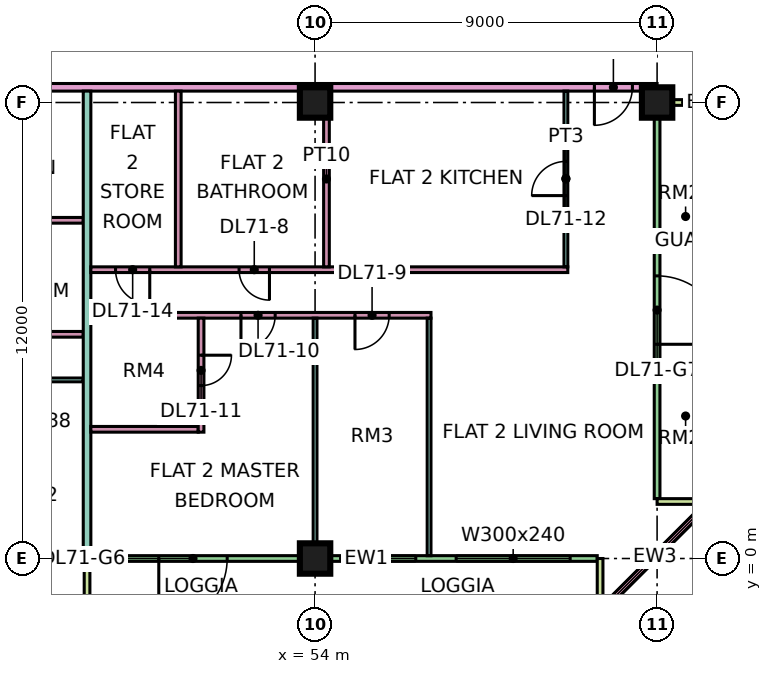
"""IFC4 building model, lengths in metres.
Left out: names, types, materials, properties, quantities, classifications, styles, units other than length and angle.
Written with IfcOpenShell. Run it as: python <this file> out.ifc"""

import sys

from ifc_helpers import new_model, si_unit, direction, frame, frame_2d, origin, origin_2d, place, context, subcontext, project, spatial, rectangle, extrude, element, fill, save


model = new_model("IFC4")
c1 = context("Model", 3, precision=1e-05, world=origin(), true_north=direction((0.0, 1.0)))
c2 = subcontext(c1, "Body", "Model", "MODEL_VIEW")
j1 = project(units=[si_unit("LENGTHUNIT", "METRE"), si_unit("PLANEANGLEUNIT", "RADIAN")], contexts=[c1])
p1 = place(None, origin())
s1 = spatial("IfcSite", under=j1, at=p1, CompositionType="ELEMENT")
p2 = place(p1, origin())
s2 = spatial("IfcBuilding", under=s1, at=p2, CompositionType="ELEMENT")
p3 = place(p2, frame((0.0, 0.0, 303.4)))
s3 = spatial("IfcBuildingStorey", under=s2, at=p3, CompositionType="ELEMENT", Elevation=303.4)
for number, where, z_axis, x_axis in (
    (1, (54.0, 0.0, 0.0), (0.0, 0.0, 1.0), (1.0, 0.0, 0.0)),
    (2, (54.0, 12.0, 0.0), (0.0, 0.0, 1.0), (1.0, 0.0, 0.0)),
    (3, (63.0, 12.0, 0.0), (0.0, 0.0, 1.0), (1.0, 0.0, 0.0)),
):
    element("IfcColumn", number, at=place(p3, frame(where, z_axis=z_axis, x_axis=x_axis)), inside=s3, PredefinedType="COLUMN", context=c2, shape_type="SweptSolid", body=[
        extrude(rectangle(XDim=0.8, YDim=0.8, at=origin_2d()), origin(), (0.0, 0.0, 1.0), 3.75),
    ])
p4 = place(p3, frame((48.075, 0.0, 0.0), z_axis=(0.0, 0.0, 1.0), x_axis=(1.0, 0.0, 0.0)))
e4 = element("IfcWall", 4, at=p4, inside=s3, PredefinedType="SOLIDWALL", context=c2, shape_type="SweptSolid", body=[
    extrude(rectangle(XDim=13.35, YDim=0.15, at=frame_2d((6.675, 0.0))), origin(), (0.0, 0.0, 1.0), 3.35),
])
p5 = place(p4, frame((1.812, 0.0, 0.0)))
e5 = element("IfcOpeningElement", 5, at=p5, cuts=e4, PredefinedType="OPENING", context=c2, shape_type="SweptSolid", body=[
    extrude(rectangle(XDim=1.8, YDim=2.4, at=frame_2d((0.9, 1.2))), frame((0.0, 0.085, 0.0), z_axis=(0.0, -1.0, 0.0), x_axis=(1.0, 0.0, 0.0)), (0.0, 0.0, 1.0), 0.17),
])
p6 = place(p4, frame((6.775, 0.0, 0.45)))
e6 = element("IfcOpeningElement", 6, at=p6, cuts=e4, PredefinedType="OPENING", context=c2, shape_type="SweptSolid", body=[
    extrude(rectangle(XDim=1.8, YDim=2.4, at=frame_2d((0.9, 1.2))), frame((0.0, 0.085, 0.0), z_axis=(0.0, -1.0, 0.0), x_axis=(1.0, 0.0, 0.0)), (0.0, 0.0, 1.0), 0.17),
])
p7 = place(p4, frame((9.637, 0.0, 0.45)))
e7 = element("IfcOpeningElement", 7, at=p7, cuts=e4, PredefinedType="OPENING", context=c2, shape_type="SweptSolid", body=[
    extrude(rectangle(XDim=3.0, YDim=2.4, at=frame_2d((1.5, 1.2))), frame((0.0, 0.085, 0.0), z_axis=(0.0, -1.0, 0.0), x_axis=(1.0, 0.0, 0.0)), (0.0, 0.0, 1.0), 0.17),
])
for number, where, z_axis, x_axis in (
    (8, (48.0, -1.5, 0.0), (0.0, 0.0, 1.0), (0.0, 1.0, 0.0)),
    (9, (61.5, -1.5, 0.0), (0.0, 0.0, 1.0), (0.0, 1.0, 0.0)),
):
    element("IfcWall", number, at=place(p3, frame(where, z_axis=z_axis, x_axis=x_axis)), inside=s3, PredefinedType="SOLIDWALL", context=c2, shape_type="SweptSolid", body=[
        extrude(rectangle(XDim=1.5, YDim=0.15, at=frame_2d((0.75, 0.0))), origin(), (0.0, 0.0, 1.0), 3.35),
    ])
p8 = place(p3, frame((61.447, -1.447, 0.0), z_axis=(0.0, 0.0, 1.0), x_axis=(0.707106781187, 0.707106781187, 0.0)))
e10 = element("IfcWall", 10, at=p8, inside=s3, PredefinedType="SOLIDWALL", context=c2, shape_type="SweptSolid", body=[
    extrude(rectangle(XDim=4.243, YDim=0.15, at=frame_2d((2.121, 0.0))), origin(), (0.0, 0.0, 1.0), 3.35),
])
p9 = place(p8, frame((0.621, 0.0, 0.45)))
e11 = element("IfcOpeningElement", 11, at=p9, cuts=e10, PredefinedType="OPENING", context=c2, shape_type="SweptSolid", body=[
    extrude(rectangle(XDim=3.0, YDim=2.4, at=frame_2d((1.5, 1.2))), frame((0.0, 0.085, 0.0), z_axis=(0.0, -1.0, 0.0), x_axis=(1.0, 0.0, 0.0)), (0.0, 0.0, 1.0), 0.17),
])
p10 = place(p3, frame((63.0, 1.575, 0.0), z_axis=(0.0, 0.0, 1.0), x_axis=(0.0, 1.0, 0.0)))
e12 = element("IfcWall", 12, at=p10, inside=s3, PredefinedType="SOLIDWALL", context=c2, shape_type="SweptSolid", body=[
    extrude(rectangle(XDim=10.35, YDim=0.15, at=frame_2d((5.175, 0.0))), origin(), (0.0, 0.0, 1.0), 3.35),
])
p11 = place(p10, frame((4.062, 0.0, 0.0)))
e13 = element("IfcOpeningElement", 13, at=p11, cuts=e12, PredefinedType="OPENING", context=c2, shape_type="SweptSolid", body=[
    extrude(rectangle(XDim=1.8, YDim=2.4, at=frame_2d((0.9, 1.2))), frame((0.0, 0.085, 0.0), z_axis=(0.0, -1.0, 0.0), x_axis=(1.0, 0.0, 0.0)), (0.0, 0.0, 1.0), 0.17),
])
for number, where, z_axis, x_axis in (
    (14, (64.5, 1.5, 0.0), (0.0, 0.0, 1.0), (-1.0, 0.0, 0.0)),
    (15, (64.5, 12.0, 0.0), (0.0, 0.0, 1.0), (-1.0, 0.0, 0.0)),
):
    element("IfcWall", number, at=place(p3, frame(where, z_axis=z_axis, x_axis=x_axis)), inside=s3, PredefinedType="SOLIDWALL", context=c2, shape_type="SweptSolid", body=[
        extrude(rectangle(XDim=1.5, YDim=0.15, at=frame_2d((0.75, 0.0))), origin(), (0.0, 0.0, 1.0), 3.35),
    ])
p12 = place(p3, frame((33.05, 4.7, 0.0), z_axis=(0.0, 0.0, 1.0), x_axis=(1.0, 0.0, 0.0)))
e16 = element("IfcWall", 16, at=p12, inside=s3, PredefinedType="PARTITIONING", context=c2, shape_type="SweptSolid", body=[
    extrude(rectangle(XDim=14.85, YDim=0.1, at=frame_2d((7.425, 0.0))), origin(), (0.0, 0.0, 1.0), 3.35),
])
p13 = place(p12, frame((1.0, 0.0, 0.0)))
e17 = element("IfcOpeningElement", 17, at=p13, cuts=e16, PredefinedType="OPENING", context=c2, shape_type="SweptSolid", body=[
    extrude(rectangle(XDim=0.9, YDim=2.1, at=frame_2d((0.45, 1.05))), frame((0.0, 0.06, 0.0), z_axis=(0.0, -1.0, 0.0), x_axis=(1.0, 0.0, 0.0)), (0.0, 0.0, 1.0), 0.12),
])
p14 = place(p12, frame((13.0, 0.0, 0.0)))
e18 = element("IfcOpeningElement", 18, at=p14, cuts=e16, PredefinedType="OPENING", context=c2, shape_type="SweptSolid", body=[
    extrude(rectangle(XDim=0.9, YDim=2.1, at=frame_2d((0.45, 1.05))), frame((0.0, 0.06, 0.0), z_axis=(0.0, -1.0, 0.0), x_axis=(1.0, 0.0, 0.0)), (0.0, 0.0, 1.0), 0.12),
])
p15 = place(p12, frame((7.0, 0.0, 0.0)))
e19 = element("IfcOpeningElement", 19, at=p15, cuts=e16, PredefinedType="OPENING", context=c2, shape_type="SweptSolid", body=[
    extrude(rectangle(XDim=0.9, YDim=2.1, at=frame_2d((0.45, 1.05))), frame((0.0, 0.06, 0.0), z_axis=(0.0, -1.0, 0.0), x_axis=(1.0, 0.0, 0.0)), (0.0, 0.0, 1.0), 0.12),
])
p16 = place(p3, frame((40.65, 12.4, 0.0), z_axis=(0.0, 0.0, 1.0), x_axis=(1.0, 0.0, 0.0)))
e20 = element("IfcWall", 20, at=p16, inside=s3, PredefinedType="PARTITIONING", context=c2, shape_type="SweptSolid", body=[
    extrude(rectangle(XDim=22.35, YDim=0.2, at=frame_2d((11.175, 0.0))), origin(), (0.0, 0.0, 1.0), 3.35),
])
p17 = place(p16, frame((20.7, 0.0, 0.0)))
e21 = element("IfcOpeningElement", 21, at=p17, cuts=e20, PredefinedType="OPENING", context=c2, shape_type="SweptSolid", body=[
    extrude(rectangle(XDim=1.0, YDim=2.1, at=frame_2d((0.5, 1.05))), frame((0.0, 0.11, 0.0), z_axis=(0.0, -1.0, 0.0), x_axis=(1.0, 0.0, 0.0)), (0.0, 0.0, 1.0), 0.22),
])
p18 = place(p16, frame((1.05, 0.0, 0.0)))
e22 = element("IfcOpeningElement", 22, at=p18, cuts=e20, PredefinedType="OPENING", context=c2, shape_type="SweptSolid", body=[
    extrude(rectangle(XDim=1.0, YDim=2.1, at=frame_2d((0.5, 1.05))), frame((0.0, 0.11, 0.0), z_axis=(0.0, -1.0, 0.0), x_axis=(1.0, 0.0, 0.0)), (0.0, 0.0, 1.0), 0.22),
])
p19 = place(p3, frame((43.725, 5.9, 0.0), z_axis=(0.0, 0.0, 1.0), x_axis=(1.0, 0.0, 0.0)))
e23 = element("IfcWall", 23, at=p19, inside=s3, PredefinedType="PARTITIONING", context=c2, shape_type="SweptSolid", body=[
    extrude(rectangle(XDim=4.175, YDim=0.15, at=frame_2d((2.087, 0.0))), origin(), (0.0, 0.0, 1.0), 3.35),
])
p20 = place(p19, frame((1.675, 0.0, 0.0)))
e24 = element("IfcOpeningElement", 24, at=p20, cuts=e23, PredefinedType="OPENING", context=c2, shape_type="SweptSolid", body=[
    extrude(rectangle(XDim=0.8, YDim=2.1, at=frame_2d((0.4, 1.05))), frame((0.0, 0.085, 0.0), z_axis=(0.0, -1.0, 0.0), x_axis=(1.0, 0.0, 0.0)), (0.0, 0.0, 1.0), 0.17),
])
p21 = place(p3, frame((43.725, 8.9, 0.0), z_axis=(0.0, 0.0, 1.0), x_axis=(1.0, 0.0, 0.0)))
e25 = element("IfcWall", 25, at=p21, inside=s3, PredefinedType="PARTITIONING", context=c2, shape_type="SweptSolid", body=[
    extrude(rectangle(XDim=4.175, YDim=0.15, at=frame_2d((2.087, 0.0))), origin(), (0.0, 0.0, 1.0), 3.35),
])
p22 = place(p3, frame((48.0, 0.0, 0.0), z_axis=(0.0, 0.0, 1.0), x_axis=(0.0, 1.0, 0.0)))
e26 = element("IfcWall", 26, at=p22, inside=s3, PredefinedType="PARTITIONING", context=c2, shape_type="SweptSolid", body=[
    extrude(rectangle(XDim=12.3, YDim=0.2, at=frame_2d((6.15, 0.0))), origin(), (0.0, 0.0, 1.0), 3.35),
])
p23 = place(p3, frame((48.1, 3.4, 0.0), z_axis=(0.0, 0.0, 1.0), x_axis=(1.0, 0.0, 0.0)))
e27 = element("IfcWall", 27, at=p23, inside=s3, PredefinedType="PARTITIONING", context=c2, shape_type="SweptSolid", body=[
    extrude(rectangle(XDim=2.825, YDim=0.15, at=frame_2d((1.413, 0.0))), origin(), (0.0, 0.0, 1.0), 3.35),
])
p24 = place(p3, frame((48.1, 6.4, 0.0), z_axis=(0.0, 0.0, 1.0), x_axis=(1.0, 0.0, 0.0)))
e28 = element("IfcWall", 28, at=p24, inside=s3, PredefinedType="PARTITIONING", context=c2, shape_type="SweptSolid", body=[
    extrude(rectangle(XDim=8.95, YDim=0.15, at=frame_2d((4.475, 0.0))), origin(), (0.0, 0.0, 1.0), 3.35),
])
p25 = place(p24, frame((6.95, 0.0, 0.0)))
e29 = element("IfcOpeningElement", 29, at=p25, cuts=e28, PredefinedType="OPENING", context=c2, shape_type="SweptSolid", body=[
    extrude(rectangle(XDim=0.9, YDim=2.1, at=frame_2d((0.45, 1.05))), frame((0.0, 0.085, 0.0), z_axis=(0.0, -1.0, 0.0), x_axis=(1.0, 0.0, 0.0)), (0.0, 0.0, 1.0), 0.17),
])
p26 = place(p24, frame((3.95, 0.0, 0.0)))
e30 = element("IfcOpeningElement", 30, at=p26, cuts=e28, PredefinedType="OPENING", context=c2, shape_type="SweptSolid", body=[
    extrude(rectangle(XDim=0.9, YDim=2.1, at=frame_2d((0.45, 1.05))), frame((0.0, 0.085, 0.0), z_axis=(0.0, -1.0, 0.0), x_axis=(1.0, 0.0, 0.0)), (0.0, 0.0, 1.0), 0.17),
])
p27 = place(p3, frame((48.1, 7.6, 0.0), z_axis=(0.0, 0.0, 1.0), x_axis=(1.0, 0.0, 0.0)))
e31 = element("IfcWall", 31, at=p27, inside=s3, PredefinedType="PARTITIONING", context=c2, shape_type="SweptSolid", body=[
    extrude(rectangle(XDim=12.55, YDim=0.15, at=frame_2d((6.275, 0.0))), origin(), (0.0, 0.0, 1.0), 3.35),
])
p28 = place(p27, frame((3.9, 0.0, 0.0)))
e32 = element("IfcOpeningElement", 32, at=p28, cuts=e31, PredefinedType="OPENING", context=c2, shape_type="SweptSolid", body=[
    extrude(rectangle(XDim=0.8, YDim=2.1, at=frame_2d((0.4, 1.05))), frame((0.0, 0.085, 0.0), z_axis=(0.0, -1.0, 0.0), x_axis=(1.0, 0.0, 0.0)), (0.0, 0.0, 1.0), 0.17),
])
p29 = place(p27, frame((0.65, 0.0, 0.0)))
e33 = element("IfcOpeningElement", 33, at=p29, cuts=e31, PredefinedType="OPENING", context=c2, shape_type="SweptSolid", body=[
    extrude(rectangle(XDim=0.9, YDim=2.1, at=frame_2d((0.45, 1.05))), frame((0.0, 0.085, 0.0), z_axis=(0.0, -1.0, 0.0), x_axis=(1.0, 0.0, 0.0)), (0.0, 0.0, 1.0), 0.17),
])
p30 = place(p3, frame((50.4, 7.675, 0.0), z_axis=(0.0, 0.0, 1.0), x_axis=(0.0, 1.0, 0.0)))
e34 = element("IfcWall", 34, at=p30, inside=s3, PredefinedType="PARTITIONING", context=c2, shape_type="SweptSolid", body=[
    extrude(rectangle(XDim=4.625, YDim=0.15, at=frame_2d((2.312, 0.0))), origin(), (0.0, 0.0, 1.0), 3.35),
])
p31 = place(p3, frame((51.0, 3.325, 0.0), z_axis=(0.0, 0.0, 1.0), x_axis=(0.0, 1.0, 0.0)))
e35 = element("IfcWall", 35, at=p31, inside=s3, PredefinedType="PARTITIONING", context=c2, shape_type="SweptSolid", body=[
    extrude(rectangle(XDim=3.0, YDim=0.15, at=frame_2d((1.5, 0.0))), origin(), (0.0, 0.0, 1.0), 3.35),
])
p32 = place(p31, frame((1.225, 0.0, 0.0)))
e36 = element("IfcOpeningElement", 36, at=p32, cuts=e35, PredefinedType="OPENING", context=c2, shape_type="SweptSolid", body=[
    extrude(rectangle(XDim=0.8, YDim=2.1, at=frame_2d((0.4, 1.05))), frame((0.0, 0.085, 0.0), z_axis=(0.0, -1.0, 0.0), x_axis=(1.0, 0.0, 0.0)), (0.0, 0.0, 1.0), 0.17),
])
p33 = place(p3, frame((54.0, 0.074, 0.0), z_axis=(0.0, 0.0, 1.0), x_axis=(0.0, 1.0, 0.0)))
e37 = element("IfcWall", 37, at=p33, inside=s3, PredefinedType="PARTITIONING", context=c2, shape_type="SweptSolid", body=[
    extrude(rectangle(XDim=6.251, YDim=0.1, at=frame_2d((3.125, 0.0))), origin(), (0.0, 0.0, 1.0), 3.35),
])
p34 = place(p3, frame((54.3, 7.675, 0.0), z_axis=(0.0, 0.0, 1.0), x_axis=(0.0, 1.0, 0.0)))
e38 = element("IfcWall", 38, at=p34, inside=s3, PredefinedType="PARTITIONING", context=c2, shape_type="SweptSolid", body=[
    extrude(rectangle(XDim=4.625, YDim=0.15, at=frame_2d((2.312, 0.0))), origin(), (0.0, 0.0, 1.0), 3.35),
])
p35 = place(p3, frame((57.0, 0.074, 0.0), z_axis=(0.0, 0.0, 1.0), x_axis=(0.0, 1.0, 0.0)))
e39 = element("IfcWall", 39, at=p35, inside=s3, PredefinedType="PARTITIONING", context=c2, shape_type="SweptSolid", body=[
    extrude(rectangle(XDim=6.251, YDim=0.1, at=frame_2d((3.125, 0.0))), origin(), (0.0, 0.0, 1.0), 3.35),
])
p36 = place(p3, frame((60.6, 7.675, 0.0), z_axis=(0.0, 0.0, 1.0), x_axis=(0.0, 1.0, 0.0)))
e40 = element("IfcWall", 40, at=p36, inside=s3, PredefinedType="PARTITIONING", context=c2, shape_type="SweptSolid", body=[
    extrude(rectangle(XDim=4.625, YDim=0.1, at=frame_2d((2.312, 0.0))), origin(), (0.0, 0.0, 1.0), 3.35),
])
p37 = place(p36, frame((1.875, 0.0, 0.0)))
e41 = element("IfcOpeningElement", 41, at=p37, cuts=e40, PredefinedType="OPENING", context=c2, shape_type="SweptSolid", body=[
    extrude(rectangle(XDim=0.9, YDim=2.1, at=frame_2d((0.45, 1.05))), frame((0.0, 0.06, 0.0), z_axis=(0.0, -1.0, 0.0), x_axis=(1.0, 0.0, 0.0)), (0.0, 0.0, 1.0), 0.12),
])
p38 = place(p5, frame((1.8, 0.0, 0.0), z_axis=(0.0, 0.0, 1.0), x_axis=(-1.0, 0.0, 0.0)))
e42 = element("IfcDoor", 42, at=p38, inside=s3, OperationType="DOUBLE_DOOR_SINGLE_SWING", PredefinedType="DOOR", context=c2, shape_type="SweptSolid", body=[
    extrude(rectangle(XDim=1.8, YDim=2.4, at=frame_2d((0.9, 1.2))), frame((0.0, 0.025, 0.0), z_axis=(0.0, -1.0, 0.0), x_axis=(1.0, 0.0, 0.0)), (0.0, 0.0, 1.0), 0.05),
])
fill(e5, e42)
p39 = place(p6, origin())
e43 = element("IfcWindow", 43, at=p39, inside=s3, PartitioningType="SINGLE_PANEL", PredefinedType="WINDOW", context=c2, shape_type="SweptSolid", body=[
    extrude(rectangle(XDim=1.8, YDim=2.4, at=frame_2d((0.9, 1.2))), frame((0.0, 0.03, 0.0), z_axis=(0.0, -1.0, 0.0), x_axis=(1.0, 0.0, 0.0)), (0.0, 0.0, 1.0), 0.06),
])
fill(e6, e43)
p40 = place(p7, origin())
e44 = element("IfcWindow", 44, at=p40, inside=s3, PartitioningType="SINGLE_PANEL", PredefinedType="WINDOW", context=c2, shape_type="SweptSolid", body=[
    extrude(rectangle(XDim=3.0, YDim=2.4, at=frame_2d((1.5, 1.2))), frame((0.0, 0.03, 0.0), z_axis=(0.0, -1.0, 0.0), x_axis=(1.0, 0.0, 0.0)), (0.0, 0.0, 1.0), 0.06),
])
fill(e7, e44)
p41 = place(p9, origin())
e45 = element("IfcWindow", 45, at=p41, inside=s3, PartitioningType="SINGLE_PANEL", PredefinedType="WINDOW", context=c2, shape_type="SweptSolid", body=[
    extrude(rectangle(XDim=3.0, YDim=2.4, at=frame_2d((1.5, 1.2))), frame((0.0, 0.03, 0.0), z_axis=(0.0, -1.0, 0.0), x_axis=(1.0, 0.0, 0.0)), (0.0, 0.0, 1.0), 0.06),
])
fill(e11, e45)
p42 = place(p11, frame((1.8, 0.0, 0.0), z_axis=(0.0, 0.0, 1.0), x_axis=(-1.0, 0.0, 0.0)))
e46 = element("IfcDoor", 46, at=p42, inside=s3, OperationType="DOUBLE_DOOR_SINGLE_SWING", PredefinedType="DOOR", context=c2, shape_type="SweptSolid", body=[
    extrude(rectangle(XDim=1.8, YDim=2.4, at=frame_2d((0.9, 1.2))), frame((0.0, 0.025, 0.0), z_axis=(0.0, -1.0, 0.0), x_axis=(1.0, 0.0, 0.0)), (0.0, 0.0, 1.0), 0.05),
])
fill(e13, e46)
p43 = place(p28, origin())
e47 = element("IfcDoor", 47, at=p43, inside=s3, OperationType="SINGLE_SWING_RIGHT", PredefinedType="DOOR", context=c2, shape_type="SweptSolid", body=[
    extrude(rectangle(XDim=0.8, YDim=2.1, at=frame_2d((0.4, 1.05))), frame((0.0, 0.025, 0.0), z_axis=(0.0, -1.0, 0.0), x_axis=(1.0, 0.0, 0.0)), (0.0, 0.0, 1.0), 0.05),
])
fill(e32, e47)
p44 = place(p25, frame((0.9, 0.0, 0.0), z_axis=(0.0, 0.0, 1.0), x_axis=(-1.0, 0.0, 0.0)))
e48 = element("IfcDoor", 48, at=p44, inside=s3, OperationType="SINGLE_SWING_LEFT", PredefinedType="DOOR", context=c2, shape_type="SweptSolid", body=[
    extrude(rectangle(XDim=0.9, YDim=2.1, at=frame_2d((0.45, 1.05))), frame((0.0, 0.025, 0.0), z_axis=(0.0, -1.0, 0.0), x_axis=(1.0, 0.0, 0.0)), (0.0, 0.0, 1.0), 0.05),
])
fill(e29, e48)
p45 = place(p26, frame((0.9, 0.0, 0.0), z_axis=(0.0, 0.0, 1.0), x_axis=(-1.0, 0.0, 0.0)))
e49 = element("IfcDoor", 49, at=p45, inside=s3, OperationType="SINGLE_SWING_LEFT", PredefinedType="DOOR", context=c2, shape_type="SweptSolid", body=[
    extrude(rectangle(XDim=0.9, YDim=2.1, at=frame_2d((0.45, 1.05))), frame((0.0, 0.025, 0.0), z_axis=(0.0, -1.0, 0.0), x_axis=(1.0, 0.0, 0.0)), (0.0, 0.0, 1.0), 0.05),
])
fill(e30, e49)
p46 = place(p32, origin())
e50 = element("IfcDoor", 50, at=p46, inside=s3, OperationType="SINGLE_SWING_RIGHT", PredefinedType="DOOR", context=c2, shape_type="SweptSolid", body=[
    extrude(rectangle(XDim=0.8, YDim=2.1, at=frame_2d((0.4, 1.05))), frame((0.0, 0.025, 0.0), z_axis=(0.0, -1.0, 0.0), x_axis=(1.0, 0.0, 0.0)), (0.0, 0.0, 1.0), 0.05),
])
fill(e36, e50)
p47 = place(p37, origin())
e51 = element("IfcDoor", 51, at=p47, inside=s3, OperationType="SINGLE_SWING_LEFT", PredefinedType="DOOR", context=c2, shape_type="SweptSolid", body=[
    extrude(rectangle(XDim=0.9, YDim=2.1, at=frame_2d((0.45, 1.05))), frame((0.0, 0.025, 0.0), z_axis=(0.0, -1.0, 0.0), x_axis=(1.0, 0.0, 0.0)), (0.0, 0.0, 1.0), 0.05),
])
fill(e41, e51)
p48 = place(p17, frame((1.0, 0.0, 0.0), z_axis=(0.0, 0.0, 1.0), x_axis=(-1.0, 0.0, 0.0)))
e52 = element("IfcDoor", 52, at=p48, inside=s3, OperationType="SINGLE_SWING_LEFT", PredefinedType="DOOR", context=c2, shape_type="SweptSolid", body=[
    extrude(rectangle(XDim=1.0, YDim=2.1, at=frame_2d((0.5, 1.05))), frame((0.0, 0.025, 0.0), z_axis=(0.0, -1.0, 0.0), x_axis=(1.0, 0.0, 0.0)), (0.0, 0.0, 1.0), 0.05),
])
fill(e21, e52)
p49 = place(p29, origin())
e53 = element("IfcDoor", 53, at=p49, inside=s3, OperationType="SINGLE_SWING_RIGHT", PredefinedType="DOOR", context=c2, shape_type="SweptSolid", body=[
    extrude(rectangle(XDim=0.9, YDim=2.1, at=frame_2d((0.45, 1.05))), frame((0.0, 0.025, 0.0), z_axis=(0.0, -1.0, 0.0), x_axis=(1.0, 0.0, 0.0)), (0.0, 0.0, 1.0), 0.05),
])
fill(e33, e53)
save(model, sys.argv[1])
